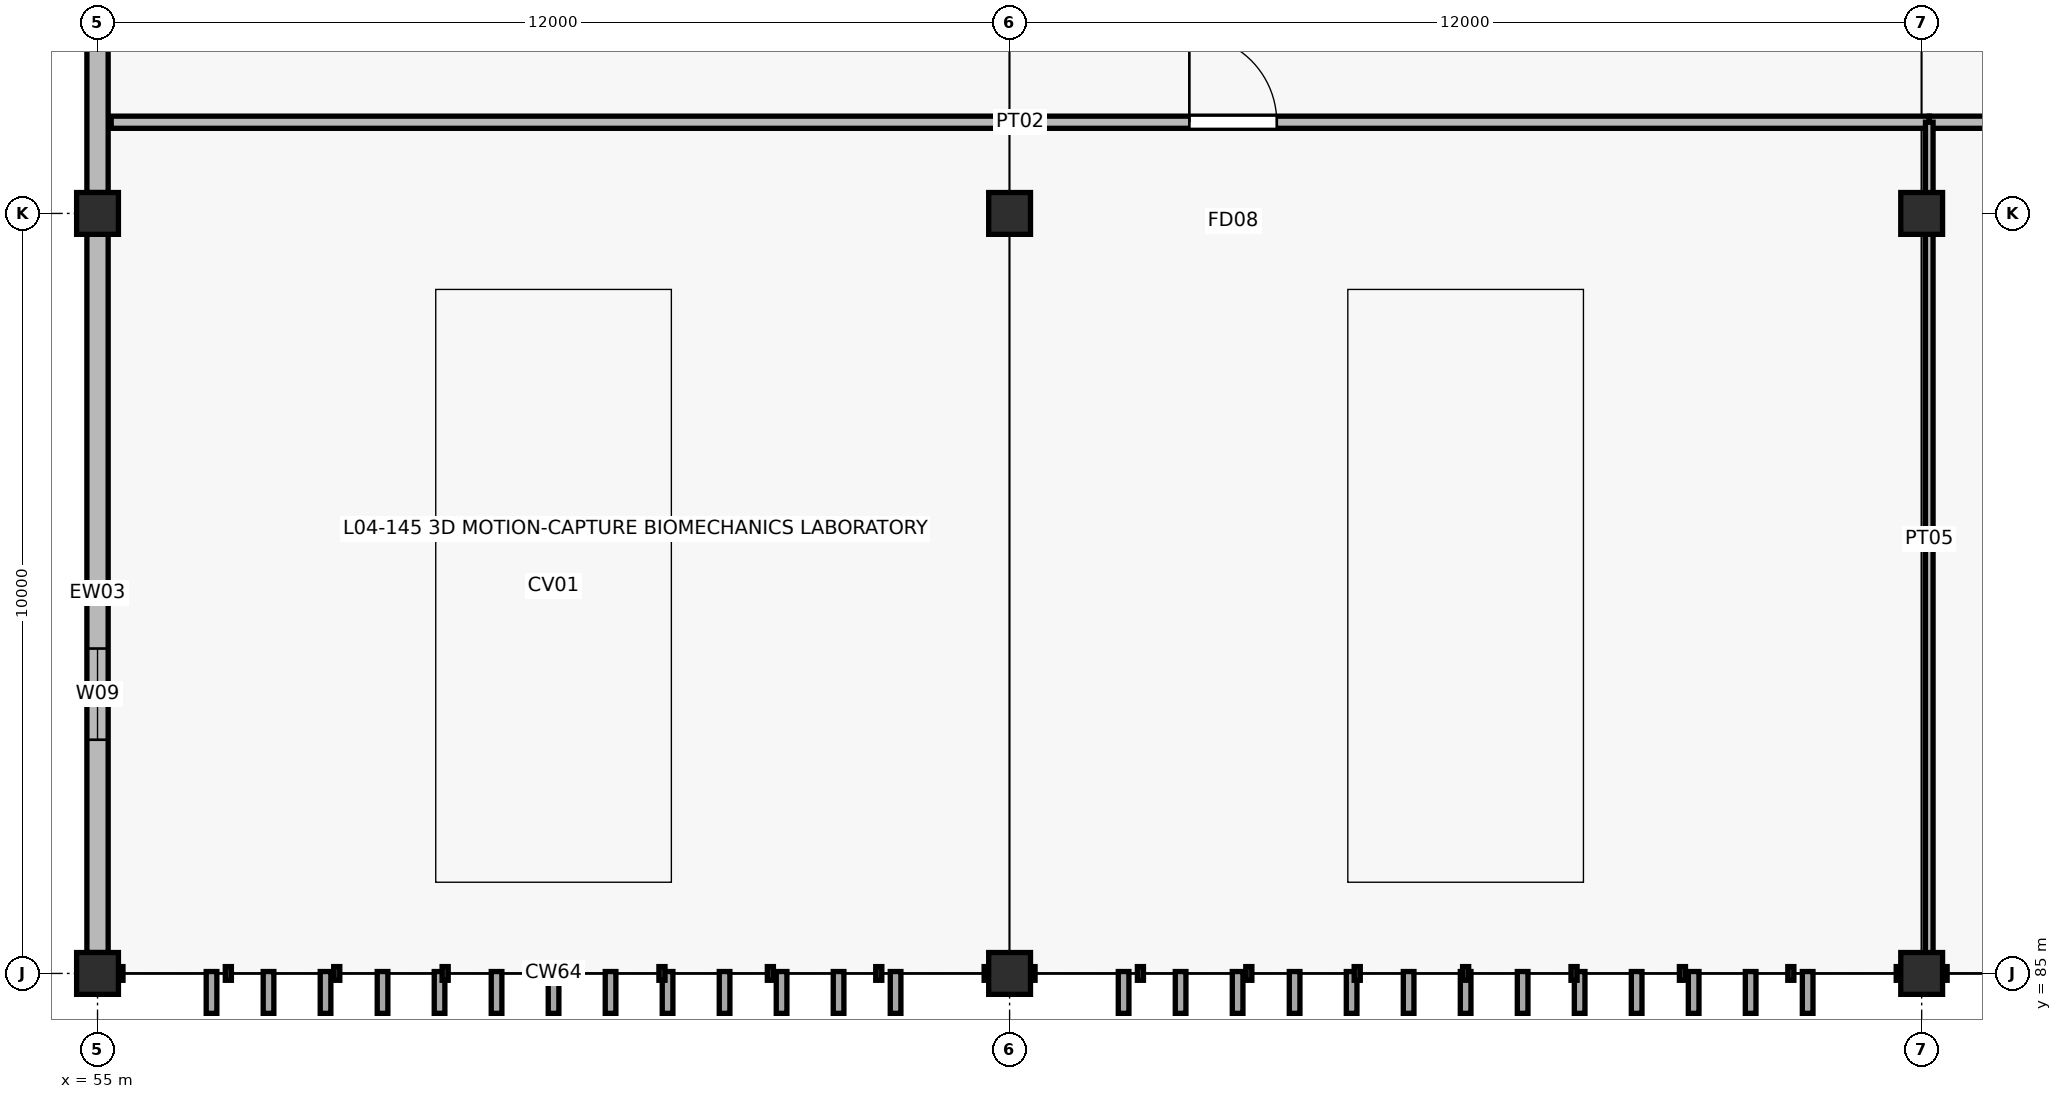
"""IFC4 building model, lengths in metres.
Left out: names, types, materials, properties, quantities, classifications, styles, units other than length and angle.
Written with IfcOpenShell. Run it as: python <this file> out.ifc"""

import sys

from ifc_helpers import new_model, si_unit, direction, frame, frame_2d, origin, origin_2d, place, context, subcontext, project, spatial, rectangle, extrude, element, fill, save


model = new_model("IFC4")
c1 = context("Model", 3, precision=1e-05, world=origin(), true_north=direction((0.0, 1.0)))
c2 = subcontext(c1, "Body", "Model", "MODEL_VIEW")
j1 = project(units=[si_unit("LENGTHUNIT", "METRE"), si_unit("PLANEANGLEUNIT", "RADIAN")], contexts=[c1])
p1 = place(None, origin())
s1 = spatial("IfcSite", under=j1, at=p1, CompositionType="ELEMENT")
p2 = place(p1, origin())
s2 = spatial("IfcBuilding", under=s1, at=p2, CompositionType="ELEMENT")
p3 = place(p2, frame((0.0, 0.0, 17.4)))
s3 = spatial("IfcBuildingStorey", under=s2, at=p3, CompositionType="ELEMENT", Elevation=17.4)
for number, where, z_axis, x_axis in (
    (1, (55.0, 85.0, 0.0), (0.0, 0.0, 1.0), (1.0, 0.0, 0.0)),
    (2, (55.0, 95.0, 0.0), (0.0, 0.0, 1.0), (1.0, 0.0, 0.0)),
    (3, (67.0, 85.0, 0.0), (0.0, 0.0, 1.0), (1.0, 0.0, 0.0)),
    (4, (67.0, 95.0, 0.0), (0.0, 0.0, 1.0), (1.0, 0.0, 0.0)),
    (5, (79.0, 85.0, 0.0), (0.0, 0.0, 1.0), (1.0, 0.0, 0.0)),
    (6, (79.0, 95.0, 0.0), (0.0, 0.0, 1.0), (1.0, 0.0, 0.0)),
):
    element("IfcColumn", number, at=place(p3, frame(where, z_axis=z_axis, x_axis=x_axis)), inside=s3, PredefinedType="COLUMN", context=c2, shape_type="SweptSolid", body=[
        extrude(rectangle(XDim=0.55, YDim=0.55, at=origin_2d()), origin(), (0.0, 0.0, 1.0), 4.2),
    ])
p4 = place(p3, frame((55.0, 85.275, 0.0), z_axis=(0.0, 0.0, 1.0), x_axis=(0.0, 1.0, 0.0)))
e7 = element("IfcWall", 7, at=p4, inside=s3, PredefinedType="SOLIDWALL", context=c2, shape_type="SweptSolid", body=[
    extrude(rectangle(XDim=9.45, YDim=0.28, at=frame_2d((4.725, 0.0))), origin(), (0.0, 0.0, 1.0), 2.975),
])
p5 = place(p4, frame((2.8, 0.0, 0.9)))
e8 = element("IfcOpeningElement", 8, at=p5, cuts=e7, PredefinedType="OPENING", context=c2, shape_type="SweptSolid", body=[
    extrude(rectangle(XDim=1.2, YDim=1.8, at=frame_2d((0.6, 0.9))), frame((0.0, 0.15, 0.0), z_axis=(0.0, -1.0, 0.0), x_axis=(1.0, 0.0, 0.0)), (0.0, 0.0, 1.0), 0.3),
])
p6 = place(p3, frame((55.0, 95.275, 0.0), z_axis=(0.0, 0.0, 1.0), x_axis=(0.0, 1.0, 0.0)))
e9 = element("IfcWall", 9, at=p6, inside=s3, PredefinedType="SOLIDWALL", context=c2, shape_type="SweptSolid", body=[
    extrude(rectangle(XDim=9.45, YDim=0.28, at=frame_2d((4.725, 0.0))), origin(), (0.0, 0.0, 1.0), 2.975),
])
p7 = place(p6, frame((2.8, 0.0, 0.9)))
e10 = element("IfcOpeningElement", 10, at=p7, cuts=e9, PredefinedType="OPENING", context=c2, shape_type="SweptSolid", body=[
    extrude(rectangle(XDim=1.5, YDim=1.8, at=frame_2d((0.75, 0.9))), frame((0.0, 0.15, 0.0), z_axis=(0.0, -1.0, 0.0), x_axis=(1.0, 0.0, 0.0)), (0.0, 0.0, 1.0), 0.3),
])
p8 = place(p3, frame((55.18, 96.2, 0.0), z_axis=(0.0, 0.0, 1.0), x_axis=(1.0, 0.0, 0.0)))
e11 = element("IfcWall", 11, at=p8, inside=s3, PredefinedType="PARTITIONING", context=c2, shape_type="SweptSolid", body=[
    extrude(rectangle(XDim=23.92, YDim=0.16, at=frame_2d((11.96, 0.0))), origin(), (0.0, 0.0, 1.0), 2.975),
])
p9 = place(p8, frame((14.185, 0.0, 0.0)))
e12 = element("IfcOpeningElement", 12, at=p9, cuts=e11, PredefinedType="OPENING", context=c2, shape_type="SweptSolid", body=[
    extrude(rectangle(XDim=1.15, YDim=2.15, at=frame_2d((0.575, 1.075))), frame((0.0, 0.09, 0.0), z_axis=(0.0, -1.0, 0.0), x_axis=(1.0, 0.0, 0.0)), (0.0, 0.0, 1.0), 0.18),
])
p10 = place(p3, frame((79.1, 96.2, 0.0), z_axis=(0.0, 0.0, 1.0), x_axis=(1.0, 0.0, 0.0)))
e13 = element("IfcWall", 13, at=p10, inside=s3, PredefinedType="PARTITIONING", context=c2, shape_type="SweptSolid", body=[
    extrude(rectangle(XDim=19.8, YDim=0.16, at=frame_2d((9.9, 0.0))), origin(), (0.0, 0.0, 1.0), 2.975),
])
p11 = place(p10, frame((8.2, 0.0, 0.0)))
e14 = element("IfcOpeningElement", 14, at=p11, cuts=e13, PredefinedType="OPENING", context=c2, shape_type="SweptSolid", body=[
    extrude(rectangle(XDim=1.4, YDim=2.2, at=frame_2d((0.7, 1.1))), frame((0.0, 0.09, 0.0), z_axis=(0.0, -1.0, 0.0), x_axis=(1.0, 0.0, 0.0)), (0.0, 0.0, 1.0), 0.18),
])
p12 = place(p3, frame((79.1, 85.22, 0.0), z_axis=(0.0, 0.0, 1.0), x_axis=(0.0, 1.0, 0.0)))
e15 = element("IfcWall", 15, at=p12, inside=s3, PredefinedType="PARTITIONING", context=c2, shape_type="SweptSolid", body=[
    extrude(rectangle(XDim=10.98, YDim=0.1, at=frame_2d((5.49, 0.0))), origin(), (0.0, 0.0, 1.0), 2.975),
])
p13 = place(p5, origin())
e16 = element("IfcWindow", 16, at=p13, inside=s3, PartitioningType="SINGLE_PANEL", PredefinedType="WINDOW", context=c2, shape_type="SweptSolid", body=[
    extrude(rectangle(XDim=1.2, YDim=1.8, at=frame_2d((0.6, 0.9))), frame((0.0, 0.03, 0.0), z_axis=(0.0, -1.0, 0.0), x_axis=(1.0, 0.0, 0.0)), (0.0, 0.0, 1.0), 0.06),
])
fill(e8, e16)
p14 = place(p9, origin())
e17 = element("IfcDoor", 17, at=p14, inside=s3, OperationType="SINGLE_SWING_LEFT", PredefinedType="DOOR", context=c2, shape_type="SweptSolid", body=[
    extrude(rectangle(XDim=1.15, YDim=2.15, at=frame_2d((0.575, 1.075))), frame((0.0, 0.025, 0.0), z_axis=(0.0, -1.0, 0.0), x_axis=(1.0, 0.0, 0.0)), (0.0, 0.0, 1.0), 0.05),
])
fill(e12, e17)
save(model, sys.argv[1])
